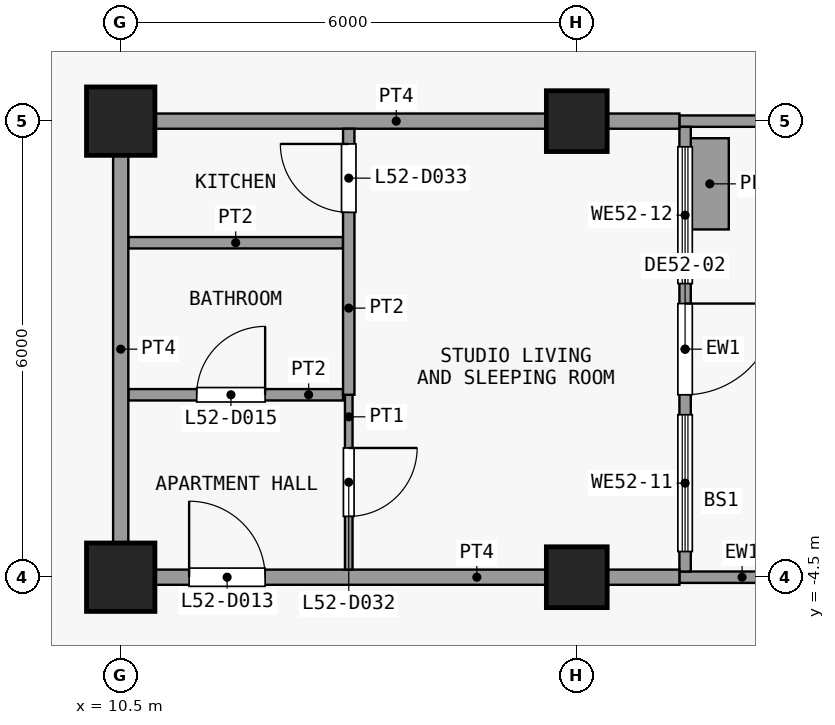
"""IFC4 building model, lengths in metres.
Left out: names, types, materials, properties, quantities, classifications, styles, units other than length and angle.
Written with IfcOpenShell. Run it as: python <this file> out.ifc"""

import sys

from ifc_helpers import new_model, si_unit, direction, frame, frame_2d, origin, origin_2d, place, context, subcontext, project, spatial, rectangle, extrude, element, fill, save


model = new_model("IFC4")
c1 = context("Model", 3, precision=1e-05, world=origin(), true_north=direction((0.0, 1.0)))
c2 = subcontext(c1, "Body", "Model", "MODEL_VIEW")
j1 = project(units=[si_unit("LENGTHUNIT", "METRE"), si_unit("PLANEANGLEUNIT", "RADIAN")], contexts=[c1])
p1 = place(None, origin())
s1 = spatial("IfcSite", under=j1, at=p1, CompositionType="ELEMENT")
p2 = place(p1, origin())
s2 = spatial("IfcBuilding", under=s1, at=p2, CompositionType="ELEMENT")
p3 = place(p2, frame((0.0, 0.0, 208.7)))
s3 = spatial("IfcBuildingStorey", under=s2, at=p3, CompositionType="ELEMENT", Elevation=208.7)
for number, where, z_axis, x_axis in (
    (1, (10.5, -4.5, 0.0), (0.0, 0.0, 1.0), (1.0, 0.0, 0.0)),
    (2, (10.5, 1.5, 0.0), (0.0, 0.0, 1.0), (1.0, 0.0, 0.0)),
):
    element("IfcColumn", number, at=place(p3, frame(where, z_axis=z_axis, x_axis=x_axis)), inside=s3, PredefinedType="COLUMN", context=c2, shape_type="SweptSolid", body=[
        extrude(rectangle(XDim=0.9, YDim=0.9, at=origin_2d()), origin(), (0.0, 0.0, 1.0), 3.6),
    ])
for number, where, z_axis, x_axis in (
    (3, (16.5, -4.5, 0.0), (0.0, 0.0, 1.0), (1.0, 0.0, 0.0)),
    (4, (16.5, 1.5, 0.0), (0.0, 0.0, 1.0), (1.0, 0.0, 0.0)),
):
    element("IfcColumn", number, at=place(p3, frame(where, z_axis=z_axis, x_axis=x_axis)), inside=s3, PredefinedType="COLUMN", context=c2, shape_type="SweptSolid", body=[
        extrude(rectangle(XDim=0.8, YDim=0.8, at=origin_2d()), origin(), (0.0, 0.0, 1.0), 3.6),
    ])
p4 = place(p3, frame((17.85, -4.5, 0.0), z_axis=(0.0, 0.0, 1.0), x_axis=(1.0, 0.0, 0.0)))
e5 = element("IfcWall", 5, at=p4, inside=s3, PredefinedType="SOLIDWALL", context=c2, shape_type="SweptSolid", body=[
    extrude(rectangle(XDim=1.65, YDim=0.15, at=frame_2d((0.825, 0.0))), origin(), (0.0, 0.0, 1.0), 3.3),
])
p5 = place(p3, frame((17.85, 1.5, 0.0), z_axis=(0.0, 0.0, 1.0), x_axis=(1.0, 0.0, 0.0)))
e6 = element("IfcWall", 6, at=p5, inside=s3, PredefinedType="SOLIDWALL", context=c2, shape_type="SweptSolid", body=[
    extrude(rectangle(XDim=2.55, YDim=0.15, at=frame_2d((1.275, 0.0))), origin(), (0.0, 0.0, 1.0), 3.3),
])
p6 = place(p3, frame((17.925, 1.425, 0.0), z_axis=(0.0, 0.0, 1.0), x_axis=(0.0, -1.0, 0.0)))
e7 = element("IfcWall", 7, at=p6, inside=s3, PredefinedType="SOLIDWALL", context=c2, shape_type="SweptSolid", body=[
    extrude(rectangle(XDim=5.85, YDim=0.15, at=frame_2d((2.925, 0.0))), origin(), (0.0, 0.0, 1.0), 3.3),
])
p7 = place(p6, frame((2.325, 0.0, 0.0)))
e8 = element("IfcOpeningElement", 8, at=p7, cuts=e7, PredefinedType="OPENING", context=c2, shape_type="SweptSolid", body=[
    extrude(rectangle(XDim=1.2, YDim=2.4, at=frame_2d((0.6, 1.2))), frame((0.0, 0.085, 0.0), z_axis=(0.0, -1.0, 0.0), x_axis=(1.0, 0.0, 0.0)), (0.0, 0.0, 1.0), 0.17),
])
p8 = place(p6, frame((3.788, 0.0, 0.9)))
e9 = element("IfcOpeningElement", 9, at=p8, cuts=e7, PredefinedType="OPENING", context=c2, shape_type="SweptSolid", body=[
    extrude(rectangle(XDim=1.8, YDim=2.1, at=frame_2d((0.9, 1.05))), frame((0.0, 0.085, 0.0), z_axis=(0.0, -1.0, 0.0), x_axis=(1.0, 0.0, 0.0)), (0.0, 0.0, 1.0), 0.17),
])
p9 = place(p6, frame((0.262, 0.0, 0.9)))
e10 = element("IfcOpeningElement", 10, at=p9, cuts=e7, PredefinedType="OPENING", context=c2, shape_type="SweptSolid", body=[
    extrude(rectangle(XDim=1.8, YDim=2.1, at=frame_2d((0.9, 1.05))), frame((0.0, 0.085, 0.0), z_axis=(0.0, -1.0, 0.0), x_axis=(1.0, 0.0, 0.0)), (0.0, 0.0, 1.0), 0.17),
])
p10 = place(p3, frame((18.25, 0.075, 0.0), z_axis=(0.0, 0.0, 1.0), x_axis=(0.0, 1.0, 0.0)))
e11 = element("IfcWall", 11, at=p10, inside=s3, PredefinedType="USERDEFINED", context=c2, shape_type="SweptSolid", body=[
    extrude(rectangle(XDim=1.2, YDim=0.5, at=frame_2d((0.6, 0.0))), origin(), (0.0, 0.0, 1.0), 0.9),
])
p11 = place(p3, frame((10.4, -4.5, 0.0), z_axis=(0.0, 0.0, 1.0), x_axis=(1.0, 0.0, 0.0)))
e12 = element("IfcWall", 12, at=p11, inside=s3, PredefinedType="PARTITIONING", context=c2, shape_type="SweptSolid", body=[
    extrude(rectangle(XDim=7.45, YDim=0.2, at=frame_2d((3.725, 0.0))), origin(), (0.0, 0.0, 1.0), 3.3),
])
p12 = place(p11, frame((1.0, 0.0, 0.0)))
e13 = element("IfcOpeningElement", 13, at=p12, cuts=e12, PredefinedType="OPENING", context=c2, shape_type="SweptSolid", body=[
    extrude(rectangle(XDim=1.0, YDim=2.1, at=frame_2d((0.5, 1.05))), frame((0.0, 0.11, 0.0), z_axis=(0.0, -1.0, 0.0), x_axis=(1.0, 0.0, 0.0)), (0.0, 0.0, 1.0), 0.22),
])
p13 = place(p3, frame((10.6, -2.1, 0.0), z_axis=(0.0, 0.0, 1.0), x_axis=(1.0, 0.0, 0.0)))
e14 = element("IfcWall", 14, at=p13, inside=s3, PredefinedType="PARTITIONING", context=c2, shape_type="SweptSolid", body=[
    extrude(rectangle(XDim=2.825, YDim=0.15, at=frame_2d((1.413, 0.0))), origin(), (0.0, 0.0, 1.0), 3.3),
])
p14 = place(p13, frame((0.9, 0.0, 0.0)))
e15 = element("IfcOpeningElement", 15, at=p14, cuts=e14, PredefinedType="OPENING", context=c2, shape_type="SweptSolid", body=[
    extrude(rectangle(XDim=0.9, YDim=2.1, at=frame_2d((0.45, 1.05))), frame((0.0, 0.085, 0.0), z_axis=(0.0, -1.0, 0.0), x_axis=(1.0, 0.0, 0.0)), (0.0, 0.0, 1.0), 0.17),
])
p15 = place(p3, frame((10.6, -0.1, 0.0), z_axis=(0.0, 0.0, 1.0), x_axis=(1.0, 0.0, 0.0)))
e16 = element("IfcWall", 16, at=p15, inside=s3, PredefinedType="PARTITIONING", context=c2, shape_type="SweptSolid", body=[
    extrude(rectangle(XDim=2.825, YDim=0.15, at=frame_2d((1.413, 0.0))), origin(), (0.0, 0.0, 1.0), 3.3),
])
p16 = place(p3, frame((10.4, 1.5, 0.0), z_axis=(0.0, 0.0, 1.0), x_axis=(1.0, 0.0, 0.0)))
e17 = element("IfcWall", 17, at=p16, inside=s3, PredefinedType="PARTITIONING", context=c2, shape_type="SweptSolid", body=[
    extrude(rectangle(XDim=7.45, YDim=0.2, at=frame_2d((3.725, 0.0))), origin(), (0.0, 0.0, 1.0), 3.3),
])
p17 = place(p3, frame((10.5, -4.4, 0.0), z_axis=(0.0, 0.0, 1.0), x_axis=(0.0, 1.0, 0.0)))
e18 = element("IfcWall", 18, at=p17, inside=s3, PredefinedType="PARTITIONING", context=c2, shape_type="SweptSolid", body=[
    extrude(rectangle(XDim=5.8, YDim=0.2, at=frame_2d((2.9, 0.0))), origin(), (0.0, 0.0, 1.0), 3.3),
])
p18 = place(p3, frame((13.5, -4.4, 0.0), z_axis=(0.0, 0.0, 1.0), x_axis=(0.0, 1.0, 0.0)))
e19 = element("IfcWall", 19, at=p18, inside=s3, PredefinedType="PARTITIONING", context=c2, shape_type="SweptSolid", body=[
    extrude(rectangle(XDim=2.3, YDim=0.1, at=frame_2d((1.15, 0.0))), origin(), (0.0, 0.0, 1.0), 3.3),
])
p19 = place(p18, frame((0.7, 0.0, 0.0)))
e20 = element("IfcOpeningElement", 20, at=p19, cuts=e19, PredefinedType="OPENING", context=c2, shape_type="SweptSolid", body=[
    extrude(rectangle(XDim=0.9, YDim=2.1, at=frame_2d((0.45, 1.05))), frame((0.0, 0.06, 0.0), z_axis=(0.0, -1.0, 0.0), x_axis=(1.0, 0.0, 0.0)), (0.0, 0.0, 1.0), 0.12),
])
p20 = place(p3, frame((13.5, -2.1, 0.0), z_axis=(0.0, 0.0, 1.0), x_axis=(0.0, 1.0, 0.0)))
e21 = element("IfcWall", 21, at=p20, inside=s3, PredefinedType="PARTITIONING", context=c2, shape_type="SweptSolid", body=[
    extrude(rectangle(XDim=3.5, YDim=0.15, at=frame_2d((1.75, 0.0))), origin(), (0.0, 0.0, 1.0), 3.3),
])
p21 = place(p20, frame((2.4, 0.0, 0.0)))
e22 = element("IfcOpeningElement", 22, at=p21, cuts=e21, PredefinedType="OPENING", context=c2, shape_type="SweptSolid", body=[
    extrude(rectangle(XDim=0.9, YDim=2.1, at=frame_2d((0.45, 1.05))), frame((0.0, 0.085, 0.0), z_axis=(0.0, -1.0, 0.0), x_axis=(1.0, 0.0, 0.0)), (0.0, 0.0, 1.0), 0.17),
])
p22 = place(p7, origin())
e23 = element("IfcDoor", 23, at=p22, inside=s3, OperationType="SINGLE_SWING_LEFT", PredefinedType="DOOR", context=c2, shape_type="SweptSolid", body=[
    extrude(rectangle(XDim=1.2, YDim=2.4, at=frame_2d((0.6, 1.2))), frame((0.0, 0.025, 0.0), z_axis=(0.0, -1.0, 0.0), x_axis=(1.0, 0.0, 0.0)), (0.0, 0.0, 1.0), 0.05),
])
fill(e8, e23)
p23 = place(p8, origin())
e24 = element("IfcWindow", 24, at=p23, inside=s3, PartitioningType="SINGLE_PANEL", PredefinedType="WINDOW", context=c2, shape_type="SweptSolid", body=[
    extrude(rectangle(XDim=1.8, YDim=2.1, at=frame_2d((0.9, 1.05))), frame((0.0, 0.03, 0.0), z_axis=(0.0, -1.0, 0.0), x_axis=(1.0, 0.0, 0.0)), (0.0, 0.0, 1.0), 0.06),
])
fill(e9, e24)
p24 = place(p9, origin())
e25 = element("IfcWindow", 25, at=p24, inside=s3, PartitioningType="SINGLE_PANEL", PredefinedType="WINDOW", context=c2, shape_type="SweptSolid", body=[
    extrude(rectangle(XDim=1.8, YDim=2.1, at=frame_2d((0.9, 1.05))), frame((0.0, 0.03, 0.0), z_axis=(0.0, -1.0, 0.0), x_axis=(1.0, 0.0, 0.0)), (0.0, 0.0, 1.0), 0.06),
])
fill(e10, e25)
p25 = place(p12, origin())
e26 = element("IfcDoor", 26, at=p25, inside=s3, OperationType="SINGLE_SWING_RIGHT", PredefinedType="DOOR", context=c2, shape_type="SweptSolid", body=[
    extrude(rectangle(XDim=1.0, YDim=2.1, at=frame_2d((0.5, 1.05))), frame((0.0, 0.025, 0.0), z_axis=(0.0, -1.0, 0.0), x_axis=(1.0, 0.0, 0.0)), (0.0, 0.0, 1.0), 0.05),
])
fill(e13, e26)
p26 = place(p14, origin())
e27 = element("IfcDoor", 27, at=p26, inside=s3, OperationType="SINGLE_SWING_LEFT", PredefinedType="DOOR", context=c2, shape_type="SweptSolid", body=[
    extrude(rectangle(XDim=0.9, YDim=2.1, at=frame_2d((0.45, 1.05))), frame((0.0, 0.025, 0.0), z_axis=(0.0, -1.0, 0.0), x_axis=(1.0, 0.0, 0.0)), (0.0, 0.0, 1.0), 0.05),
])
fill(e15, e27)
p27 = place(p19, origin())
e28 = element("IfcDoor", 28, at=p27, inside=s3, OperationType="SINGLE_SWING_RIGHT", PredefinedType="DOOR", context=c2, shape_type="SweptSolid", body=[
    extrude(rectangle(XDim=0.9, YDim=2.1, at=frame_2d((0.45, 1.05))), frame((0.0, 0.025, 0.0), z_axis=(0.0, -1.0, 0.0), x_axis=(1.0, 0.0, 0.0)), (0.0, 0.0, 1.0), 0.05),
])
fill(e20, e28)
p28 = place(p21, origin())
e29 = element("IfcDoor", 29, at=p28, inside=s3, OperationType="SINGLE_SWING_LEFT", PredefinedType="DOOR", context=c2, shape_type="SweptSolid", body=[
    extrude(rectangle(XDim=0.9, YDim=2.1, at=frame_2d((0.45, 1.05))), frame((0.0, 0.025, 0.0), z_axis=(0.0, -1.0, 0.0), x_axis=(1.0, 0.0, 0.0)), (0.0, 0.0, 1.0), 0.05),
])
fill(e22, e29)
save(model, sys.argv[1])
